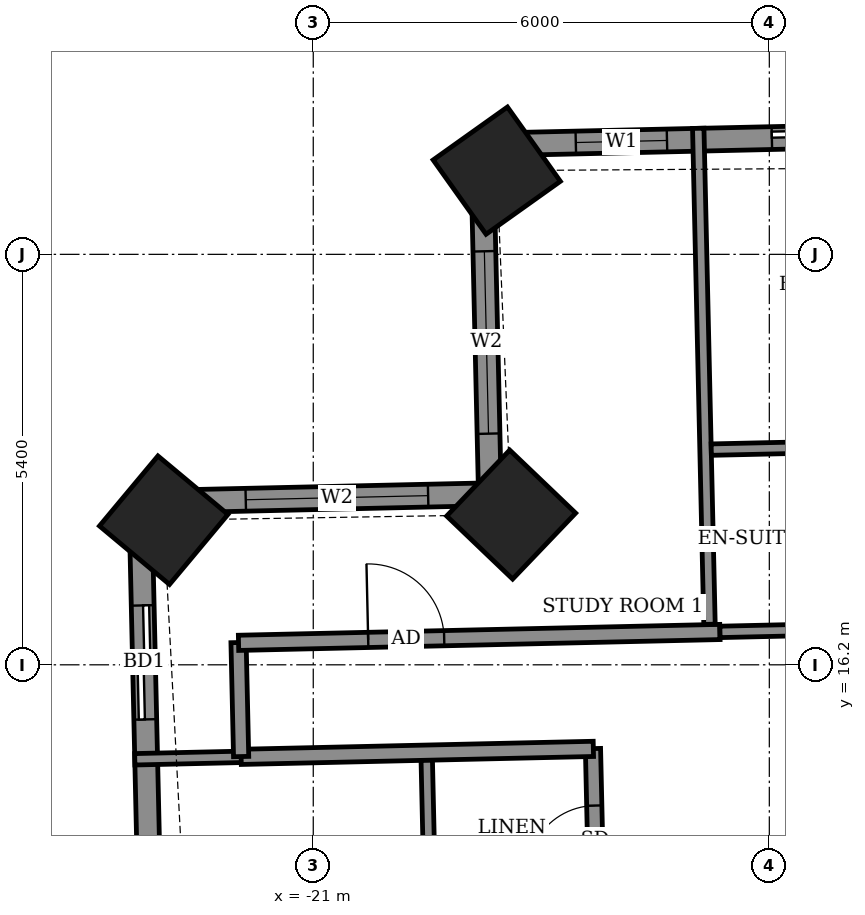
"""IFC4 building model, lengths in metres.
Left out: names, types, materials, properties, quantities, classifications, styles, units other than length and angle.
Written with IfcOpenShell. Run it as: python <this file> out.ifc"""

import sys

from ifc_helpers import new_model, si_unit, direction, frame, frame_2d, origin, origin_2d, place, context, subcontext, project, spatial, rectangle, extrude, element, fill, save


model = new_model("IFC4")
c1 = context("Model", 3, precision=1e-05, world=origin(), true_north=direction((0.0, 1.0)))
c2 = subcontext(c1, "Body", "Model", "MODEL_VIEW")
j1 = project(units=[si_unit("LENGTHUNIT", "METRE"), si_unit("PLANEANGLEUNIT", "RADIAN")], contexts=[c1])
p1 = place(None, origin())
s1 = spatial("IfcSite", under=j1, at=p1, CompositionType="ELEMENT")
p2 = place(p1, origin())
s2 = spatial("IfcBuilding", under=s1, at=p2, CompositionType="ELEMENT")
p3 = place(p2, frame((0.0, 0.0, 186.1)))
s3 = spatial("IfcBuildingStorey", under=s2, at=p3, CompositionType="ELEMENT", Elevation=186.1)
for number, where, z_axis, x_axis in (
    (1, (-18.586, 22.701, -0.55), (0.0, 0.0, 1.0), (-0.815, -0.58, 0.0)),
    (2, (-18.396, 18.177, -0.55), (0.0, 0.0, 1.0), (-0.691, -0.723, 0.0)),
    (3, (-22.968, 18.103, -0.55), (0.0, 0.0, 1.0), (-0.641, -0.768, 0.0)),
):
    element("IfcColumn", number, at=place(p3, frame(where, z_axis=z_axis, x_axis=x_axis)), inside=s3, PredefinedType="COLUMN", context=c2, shape_type="SweptSolid", body=[
        extrude(rectangle(XDim=1.2, YDim=1.2, at=origin_2d()), origin(), (0.0, 0.0, 1.0), 3.6),
    ])
p4 = place(p3, frame((21.589, 23.959, 0.0), z_axis=(0.0, 0.0, 1.0), x_axis=(-0.999742671382, -0.022684598702, 0.0)))
e4 = element("IfcWall", 4, at=p4, inside=s3, PredefinedType="SOLIDWALL", context=c2, shape_type="SweptSolid", body=[
    extrude(rectangle(XDim=40.381, YDim=0.3, at=frame_2d((20.19, 0.0))), origin(), (0.0, 0.0, 1.0), 3.05),
])
p5 = place(p4, frame((1.553, 0.0, 0.0)))
e5 = element("IfcOpeningElement", 5, at=p5, cuts=e4, PredefinedType="OPENING", context=c2, shape_type="SweptSolid", body=[
    extrude(rectangle(XDim=1.5, YDim=2.4, at=frame_2d((0.75, 1.2))), frame((0.0, 0.16, 0.0), z_axis=(0.0, -1.0, 0.0), x_axis=(1.0, 0.0, 0.0)), (0.0, 0.0, 1.0), 0.32),
])
p6 = place(p4, frame((4.33, 0.0, 0.0)))
e6 = element("IfcOpeningElement", 6, at=p6, cuts=e4, PredefinedType="OPENING", context=c2, shape_type="SweptSolid", body=[
    extrude(rectangle(XDim=1.5, YDim=2.4, at=frame_2d((0.75, 1.2))), frame((0.0, 0.16, 0.0), z_axis=(0.0, -1.0, 0.0), x_axis=(1.0, 0.0, 0.0)), (0.0, 0.0, 1.0), 0.32),
])
p7 = place(p4, frame((9.43, 0.0, 0.0)))
e7 = element("IfcOpeningElement", 7, at=p7, cuts=e4, PredefinedType="OPENING", context=c2, shape_type="SweptSolid", body=[
    extrude(rectangle(XDim=1.5, YDim=2.4, at=frame_2d((0.75, 1.2))), frame((0.0, 0.16, 0.0), z_axis=(0.0, -1.0, 0.0), x_axis=(1.0, 0.0, 0.0)), (0.0, 0.0, 1.0), 0.32),
])
p8 = place(p4, frame((14.37, 0.0, 0.0)))
e8 = element("IfcOpeningElement", 8, at=p8, cuts=e4, PredefinedType="OPENING", context=c2, shape_type="SweptSolid", body=[
    extrude(rectangle(XDim=1.5, YDim=2.4, at=frame_2d((0.75, 1.2))), frame((0.0, 0.16, 0.0), z_axis=(0.0, -1.0, 0.0), x_axis=(1.0, 0.0, 0.0)), (0.0, 0.0, 1.0), 0.32),
])
p9 = place(p4, frame((17.41, 0.0, 0.0)))
e9 = element("IfcOpeningElement", 9, at=p9, cuts=e4, PredefinedType="OPENING", context=c2, shape_type="SweptSolid", body=[
    extrude(rectangle(XDim=1.5, YDim=2.4, at=frame_2d((0.75, 1.2))), frame((0.0, 0.16, 0.0), z_axis=(0.0, -1.0, 0.0), x_axis=(1.0, 0.0, 0.0)), (0.0, 0.0, 1.0), 0.32),
])
p10 = place(p4, frame((22.03, 0.0, 0.0)))
e10 = element("IfcOpeningElement", 10, at=p10, cuts=e4, PredefinedType="OPENING", context=c2, shape_type="SweptSolid", body=[
    extrude(rectangle(XDim=1.5, YDim=2.4, at=frame_2d((0.75, 1.2))), frame((0.0, 0.16, 0.0), z_axis=(0.0, -1.0, 0.0), x_axis=(1.0, 0.0, 0.0)), (0.0, 0.0, 1.0), 0.32),
])
p11 = place(p4, frame((27.7, 0.0, 0.0)))
e11 = element("IfcOpeningElement", 11, at=p11, cuts=e4, PredefinedType="OPENING", context=c2, shape_type="SweptSolid", body=[
    extrude(rectangle(XDim=1.2, YDim=2.4, at=frame_2d((0.6, 1.2))), frame((0.0, 0.16, 0.0), z_axis=(0.0, -1.0, 0.0), x_axis=(1.0, 0.0, 0.0)), (0.0, 0.0, 1.0), 0.32),
])
p12 = place(p4, frame((30.48, 0.0, 0.0)))
e12 = element("IfcOpeningElement", 12, at=p12, cuts=e4, PredefinedType="OPENING", context=c2, shape_type="SweptSolid", body=[
    extrude(rectangle(XDim=1.5, YDim=2.4, at=frame_2d((0.75, 1.2))), frame((0.0, 0.16, 0.0), z_axis=(0.0, -1.0, 0.0), x_axis=(1.0, 0.0, 0.0)), (0.0, 0.0, 1.0), 0.32),
])
p13 = place(p4, frame((35.065, 0.0, 0.0)))
e13 = element("IfcOpeningElement", 13, at=p13, cuts=e4, PredefinedType="OPENING", context=c2, shape_type="SweptSolid", body=[
    extrude(rectangle(XDim=1.5, YDim=2.4, at=frame_2d((0.75, 1.2))), frame((0.0, 0.16, 0.0), z_axis=(0.0, -1.0, 0.0), x_axis=(1.0, 0.0, 0.0)), (0.0, 0.0, 1.0), 0.32),
])
p14 = place(p4, frame((37.945, 0.0, 0.9)))
e14 = element("IfcOpeningElement", 14, at=p14, cuts=e4, PredefinedType="OPENING", context=c2, shape_type="SweptSolid", body=[
    extrude(rectangle(XDim=1.2, YDim=1.5, at=frame_2d((0.6, 0.75))), frame((0.0, 0.16, 0.0), z_axis=(0.0, -1.0, 0.0), x_axis=(1.0, 0.0, 0.0)), (0.0, 0.0, 1.0), 0.32),
])
p15 = place(p3, frame((-18.781, 23.043, 0.0), z_axis=(0.0, 0.0, 1.0), x_axis=(0.022821468877, -0.999739556364, 0.0)))
e15 = element("IfcWall", 15, at=p15, inside=s3, PredefinedType="SOLIDWALL", context=c2, shape_type="SweptSolid", body=[
    extrude(rectangle(XDim=4.6, YDim=0.3, at=frame_2d((2.3, 0.0))), origin(), (0.0, 0.0, 1.0), 2.55),
])
p16 = place(p15, frame((1.403, 0.0, 0.9)))
e16 = element("IfcOpeningElement", 16, at=p16, cuts=e15, PredefinedType="OPENING", context=c2, shape_type="SweptSolid", body=[
    extrude(rectangle(XDim=2.4, YDim=1.5, at=frame_2d((1.2, 0.75))), frame((0.0, 0.16, 0.0), z_axis=(0.0, -1.0, 0.0), x_axis=(1.0, 0.0, 0.0)), (0.0, 0.0, 1.0), 0.32),
])
p17 = place(p3, frame((-18.676, 18.444, 0.0), z_axis=(0.0, 0.0, 1.0), x_axis=(-0.999744377441, -0.022609285172, 0.0)))
e17 = element("IfcWall", 17, at=p17, inside=s3, PredefinedType="SOLIDWALL", context=c2, shape_type="SweptSolid", body=[
    extrude(rectangle(XDim=4.6, YDim=0.3, at=frame_2d((2.3, 0.0))), origin(), (0.0, 0.0, 1.0), 2.55),
])
p18 = place(p17, frame((0.813, 0.0, 0.9)))
e18 = element("IfcOpeningElement", 18, at=p18, cuts=e17, PredefinedType="OPENING", context=c2, shape_type="SweptSolid", body=[
    extrude(rectangle(XDim=2.4, YDim=1.5, at=frame_2d((1.2, 0.75))), frame((0.0, 0.16, 0.0), z_axis=(0.0, -1.0, 0.0), x_axis=(1.0, 0.0, 0.0)), (0.0, 0.0, 1.0), 0.32),
])
p19 = place(p3, frame((-23.275, 18.34, 0.0), z_axis=(0.0, 0.0, 1.0), x_axis=(0.022705985163, -0.999742185885, 0.0)))
e19 = element("IfcWall", 19, at=p19, inside=s3, PredefinedType="SOLIDWALL", context=c2, shape_type="SweptSolid", body=[
    extrude(rectangle(XDim=10.43, YDim=0.3, at=frame_2d((5.215, 0.0))), origin(), (0.0, 0.0, 1.0), 3.05),
])
p20 = place(p19, frame((1.359, 0.0, 0.0)))
e20 = element("IfcOpeningElement", 20, at=p20, cuts=e19, PredefinedType="OPENING", context=c2, shape_type="SweptSolid", body=[
    extrude(rectangle(XDim=1.5, YDim=2.4, at=frame_2d((0.75, 1.2))), frame((0.0, 0.16, 0.0), z_axis=(0.0, -1.0, 0.0), x_axis=(1.0, 0.0, 0.0)), (0.0, 0.0, 1.0), 0.32),
])
p21 = place(p19, frame((6.543, 0.0, 0.9)))
e21 = element("IfcOpeningElement", 21, at=p21, cuts=e19, PredefinedType="OPENING", context=c2, shape_type="SweptSolid", body=[
    extrude(rectangle(XDim=2.4, YDim=1.5, at=frame_2d((1.2, 0.75))), frame((0.0, 0.16, 0.0), z_axis=(0.0, -1.0, 0.0), x_axis=(1.0, 0.0, 0.0)), (0.0, 0.0, 1.0), 0.32),
])
p22 = place(p3, frame((-16.684, -12.919, 0.0), z_axis=(0.0, 0.0, 1.0), x_axis=(-0.022694293906, 0.999742451346, 0.0)))
e22 = element("IfcWall", 22, at=p22, inside=s3, PredefinedType="PARTITIONING", context=c2, shape_type="SweptSolid", body=[
    extrude(rectangle(XDim=28.024, YDim=0.2, at=frame_2d((14.012, 0.0))), origin(), (0.0, 0.0, 1.0), 3.05),
])
p23 = place(p22, frame((22.825, 0.0, 0.0)))
e23 = element("IfcOpeningElement", 23, at=p23, cuts=e22, PredefinedType="OPENING", context=c2, shape_type="SweptSolid", body=[
    extrude(rectangle(XDim=1.0, YDim=2.1, at=frame_2d((0.5, 1.05))), frame((0.0, 0.11, 0.0), z_axis=(0.0, -1.0, 0.0), x_axis=(1.0, 0.0, 0.0)), (0.0, 0.0, 1.0), 0.22),
])
p24 = place(p22, frame((26.374, 0.0, 0.0)))
e24 = element("IfcOpeningElement", 24, at=p24, cuts=e22, PredefinedType="OPENING", context=c2, shape_type="SweptSolid", body=[
    extrude(rectangle(XDim=0.9, YDim=2.1, at=frame_2d((0.45, 1.05))), frame((0.0, 0.11, 0.0), z_axis=(0.0, -1.0, 0.0), x_axis=(1.0, 0.0, 0.0)), (0.0, 0.0, 1.0), 0.22),
])
p25 = place(p22, frame((16.7, 0.0, 0.0)))
e25 = element("IfcOpeningElement", 25, at=p25, cuts=e22, PredefinedType="OPENING", context=c2, shape_type="SweptSolid", body=[
    extrude(rectangle(XDim=1.0, YDim=2.1, at=frame_2d((0.5, 1.05))), frame((0.0, 0.11, 0.0), z_axis=(0.0, -1.0, 0.0), x_axis=(1.0, 0.0, 0.0)), (0.0, 0.0, 1.0), 0.22),
])
p26 = place(p22, frame((19.175, 0.0, 0.0)))
e26 = element("IfcOpeningElement", 26, at=p26, cuts=e22, PredefinedType="OPENING", context=c2, shape_type="SweptSolid", body=[
    extrude(rectangle(XDim=0.9, YDim=2.1, at=frame_2d((0.45, 1.05))), frame((0.0, 0.11, 0.0), z_axis=(0.0, -1.0, 0.0), x_axis=(1.0, 0.0, 0.0)), (0.0, 0.0, 1.0), 0.22),
])
p27 = place(p22, frame((14.725, 0.0, 0.0)))
e27 = element("IfcOpeningElement", 27, at=p27, cuts=e22, PredefinedType="OPENING", context=c2, shape_type="SweptSolid", body=[
    extrude(rectangle(XDim=1.0, YDim=2.1, at=frame_2d((0.5, 1.05))), frame((0.0, 0.11, 0.0), z_axis=(0.0, -1.0, 0.0), x_axis=(1.0, 0.0, 0.0)), (0.0, 0.0, 1.0), 0.22),
])
p28 = place(p22, frame((12.625, 0.0, 0.0)))
e28 = element("IfcOpeningElement", 28, at=p28, cuts=e22, PredefinedType="OPENING", context=c2, shape_type="SweptSolid", body=[
    extrude(rectangle(XDim=0.9, YDim=2.1, at=frame_2d((0.45, 1.05))), frame((0.0, 0.11, 0.0), z_axis=(0.0, -1.0, 0.0), x_axis=(1.0, 0.0, 0.0)), (0.0, 0.0, 1.0), 0.22),
])
p29 = place(p22, frame((10.375, 0.0, 0.0)))
e29 = element("IfcOpeningElement", 29, at=p29, cuts=e22, PredefinedType="OPENING", context=c2, shape_type="SweptSolid", body=[
    extrude(rectangle(XDim=1.0, YDim=2.1, at=frame_2d((0.5, 1.05))), frame((0.0, 0.11, 0.0), z_axis=(0.0, -1.0, 0.0), x_axis=(1.0, 0.0, 0.0)), (0.0, 0.0, 1.0), 0.22),
])
p30 = place(p22, frame((8.125, 0.0, 0.0)))
e30 = element("IfcOpeningElement", 30, at=p30, cuts=e22, PredefinedType="OPENING", context=c2, shape_type="SweptSolid", body=[
    extrude(rectangle(XDim=0.9, YDim=2.1, at=frame_2d((0.45, 1.05))), frame((0.0, 0.11, 0.0), z_axis=(0.0, -1.0, 0.0), x_axis=(1.0, 0.0, 0.0)), (0.0, 0.0, 1.0), 0.22),
])
p31 = place(p22, frame((3.462, 0.0, 0.0)))
e31 = element("IfcOpeningElement", 31, at=p31, cuts=e22, PredefinedType="OPENING", context=c2, shape_type="SweptSolid", body=[
    extrude(rectangle(XDim=1.0, YDim=2.1, at=frame_2d((0.5, 1.05))), frame((0.0, 0.11, 0.0), z_axis=(0.0, -1.0, 0.0), x_axis=(1.0, 0.0, 0.0)), (0.0, 0.0, 1.0), 0.22),
])
p32 = place(p22, frame((5.625, 0.0, 0.0)))
e32 = element("IfcOpeningElement", 32, at=p32, cuts=e22, PredefinedType="OPENING", context=c2, shape_type="SweptSolid", body=[
    extrude(rectangle(XDim=0.9, YDim=2.1, at=frame_2d((0.45, 1.05))), frame((0.0, 0.11, 0.0), z_axis=(0.0, -1.0, 0.0), x_axis=(1.0, 0.0, 0.0)), (0.0, 0.0, 1.0), 0.22),
])
p33 = place(p3, frame((-19.455, 12.649, 0.0), z_axis=(0.0, 0.0, 1.0), x_axis=(-0.022603288534, 0.999744513037, 0.0)))
e33 = element("IfcWall", 33, at=p33, inside=s3, PredefinedType="PARTITIONING", context=c2, shape_type="SweptSolid", body=[
    extrude(rectangle(XDim=2.301, YDim=0.15, at=frame_2d((1.15, 0.0))), origin(), (0.0, 0.0, 1.0), 3.05),
])
p34 = place(p3, frame((-23.348, 14.957, 0.0), z_axis=(0.0, 0.0, 1.0), x_axis=(0.999740216184, 0.022792545827, 0.0)))
e34 = element("IfcWall", 34, at=p34, inside=s3, PredefinedType="PARTITIONING", context=c2, shape_type="SweptSolid", body=[
    extrude(rectangle(XDim=1.403, YDim=0.15, at=frame_2d((0.702, 0.0))), origin(), (0.0, 0.0, 1.0), 2.55),
])
p35 = place(p3, frame((-21.949, 14.989, 0.0), z_axis=(0.0, 0.0, 1.0), x_axis=(0.999743491588, 0.022648422179, 0.0)))
e35 = element("IfcWall", 35, at=p35, inside=s3, PredefinedType="PARTITIONING", context=c2, shape_type="SweptSolid", body=[
    extrude(rectangle(XDim=4.635, YDim=0.2, at=frame_2d((2.318, 0.0))), origin(), (0.0, 0.0, 1.0), 3.05),
])
p36 = place(p3, frame((-21.949, 14.993, 0.0), z_axis=(0.0, 0.0, 1.0), x_axis=(-0.022617910375, 0.999744182344, 0.0)))
e36 = element("IfcWall", 36, at=p36, inside=s3, PredefinedType="PARTITIONING", context=c2, shape_type="SweptSolid", body=[
    extrude(rectangle(XDim=1.5, YDim=0.2, at=frame_2d((0.75, 0.0))), origin(), (0.0, 0.0, 1.0), 3.05),
])
p37 = place(p3, frame((-21.983, 16.489, 0.0), z_axis=(0.0, 0.0, 1.0), x_axis=(0.999744930163, 0.022584831499, 0.0)))
e37 = element("IfcWall", 37, at=p37, inside=s3, PredefinedType="PARTITIONING", context=c2, shape_type="SweptSolid", body=[
    extrude(rectangle(XDim=6.335, YDim=0.2, at=frame_2d((3.167, 0.0))), origin(), (0.0, 0.0, 1.0), 3.05),
])
p38 = place(p37, frame((1.706, 0.0, 0.0)))
e38 = element("IfcOpeningElement", 38, at=p38, cuts=e37, PredefinedType="OPENING", context=c2, shape_type="SweptSolid", body=[
    extrude(rectangle(XDim=1.0, YDim=2.1, at=frame_2d((0.5, 1.05))), frame((0.0, 0.11, 0.0), z_axis=(0.0, -1.0, 0.0), x_axis=(1.0, 0.0, 0.0)), (0.0, 0.0, 1.0), 0.22),
])
p39 = place(p3, frame((-15.649, 16.633, 0.0), z_axis=(0.0, 0.0, 1.0), x_axis=(0.999743261737, 0.022658565952, 0.0)))
e39 = element("IfcWall", 39, at=p39, inside=s3, PredefinedType="PARTITIONING", context=c2, shape_type="SweptSolid", body=[
    extrude(rectangle(XDim=30.536, YDim=0.15, at=frame_2d((15.268, 0.0))), origin(), (0.0, 0.0, 1.0), 3.05),
])
p40 = place(p39, frame((29.536, 0.0, 0.0)))
e40 = element("IfcOpeningElement", 40, at=p40, cuts=e39, PredefinedType="OPENING", context=c2, shape_type="SweptSolid", body=[
    extrude(rectangle(XDim=0.9, YDim=2.1, at=frame_2d((0.45, 1.05))), frame((0.0, 0.085, 0.0), z_axis=(0.0, -1.0, 0.0), x_axis=(1.0, 0.0, 0.0)), (0.0, 0.0, 1.0), 0.17),
])
p41 = place(p39, frame((27.965, 0.0, 0.0)))
e41 = element("IfcOpeningElement", 41, at=p41, cuts=e39, PredefinedType="OPENING", context=c2, shape_type="SweptSolid", body=[
    extrude(rectangle(XDim=0.9, YDim=2.1, at=frame_2d((0.45, 1.05))), frame((0.0, 0.085, 0.0), z_axis=(0.0, -1.0, 0.0), x_axis=(1.0, 0.0, 0.0)), (0.0, 0.0, 1.0), 0.17),
])
p42 = place(p39, frame((21.365, 0.0, 0.0)))
e42 = element("IfcOpeningElement", 42, at=p42, cuts=e39, PredefinedType="OPENING", context=c2, shape_type="SweptSolid", body=[
    extrude(rectangle(XDim=0.9, YDim=2.1, at=frame_2d((0.45, 1.05))), frame((0.0, 0.085, 0.0), z_axis=(0.0, -1.0, 0.0), x_axis=(1.0, 0.0, 0.0)), (0.0, 0.0, 1.0), 0.17),
])
p43 = place(p39, frame((19.565, 0.0, 0.0)))
e43 = element("IfcOpeningElement", 43, at=p43, cuts=e39, PredefinedType="OPENING", context=c2, shape_type="SweptSolid", body=[
    extrude(rectangle(XDim=0.9, YDim=2.1, at=frame_2d((0.45, 1.05))), frame((0.0, 0.085, 0.0), z_axis=(0.0, -1.0, 0.0), x_axis=(1.0, 0.0, 0.0)), (0.0, 0.0, 1.0), 0.17),
])
p44 = place(p39, frame((12.965, 0.0, 0.0)))
e44 = element("IfcOpeningElement", 44, at=p44, cuts=e39, PredefinedType="OPENING", context=c2, shape_type="SweptSolid", body=[
    extrude(rectangle(XDim=0.9, YDim=2.1, at=frame_2d((0.45, 1.05))), frame((0.0, 0.085, 0.0), z_axis=(0.0, -1.0, 0.0), x_axis=(1.0, 0.0, 0.0)), (0.0, 0.0, 1.0), 0.17),
])
p45 = place(p39, frame((11.14, 0.0, 0.0)))
e45 = element("IfcOpeningElement", 45, at=p45, cuts=e39, PredefinedType="OPENING", context=c2, shape_type="SweptSolid", body=[
    extrude(rectangle(XDim=0.9, YDim=2.1, at=frame_2d((0.45, 1.05))), frame((0.0, 0.085, 0.0), z_axis=(0.0, -1.0, 0.0), x_axis=(1.0, 0.0, 0.0)), (0.0, 0.0, 1.0), 0.17),
])
p46 = place(p39, frame((4.515, 0.0, 0.0)))
e46 = element("IfcOpeningElement", 46, at=p46, cuts=e39, PredefinedType="OPENING", context=c2, shape_type="SweptSolid", body=[
    extrude(rectangle(XDim=0.9, YDim=2.1, at=frame_2d((0.45, 1.05))), frame((0.0, 0.085, 0.0), z_axis=(0.0, -1.0, 0.0), x_axis=(1.0, 0.0, 0.0)), (0.0, 0.0, 1.0), 0.17),
])
p47 = place(p39, frame((2.715, 0.0, 0.0)))
e47 = element("IfcOpeningElement", 47, at=p47, cuts=e39, PredefinedType="OPENING", context=c2, shape_type="SweptSolid", body=[
    extrude(rectangle(XDim=0.9, YDim=2.1, at=frame_2d((0.45, 1.05))), frame((0.0, 0.085, 0.0), z_axis=(0.0, -1.0, 0.0), x_axis=(1.0, 0.0, 0.0)), (0.0, 0.0, 1.0), 0.17),
])
p48 = place(p3, frame((-15.787, 16.733, 0.0), z_axis=(0.0, 0.0, 1.0), x_axis=(-0.022667874761, 0.999743050715, 0.0)))
e48 = element("IfcWall", 48, at=p48, inside=s3, PredefinedType="PARTITIONING", context=c2, shape_type="SweptSolid", body=[
    extrude(rectangle(XDim=6.527, YDim=0.15, at=frame_2d((3.263, 0.0))), origin(), (0.0, 0.0, 1.0), 2.55),
])
p49 = place(p3, frame((-15.764, 19.031, 0.0), z_axis=(0.0, 0.0, 1.0), x_axis=(0.999749954681, 0.022361308448, 0.0)))
e49 = element("IfcWall", 49, at=p49, inside=s3, PredefinedType="PARTITIONING", context=c2, shape_type="SweptSolid", body=[
    extrude(rectangle(XDim=2.325, YDim=0.15, at=frame_2d((1.163, 0.0))), origin(), (0.0, 0.0, 1.0), 3.05),
])
p50 = place(p13, origin())
e50 = element("IfcDoor", 50, at=p50, inside=s3, OperationType="SLIDING_TO_LEFT", PredefinedType="DOOR", context=c2, shape_type="SweptSolid", body=[
    extrude(rectangle(XDim=1.5, YDim=2.4, at=frame_2d((0.75, 1.2))), frame((0.0, 0.025, 0.0), z_axis=(0.0, -1.0, 0.0), x_axis=(1.0, 0.0, 0.0)), (0.0, 0.0, 1.0), 0.05),
])
fill(e13, e50)
p51 = place(p14, origin())
e51 = element("IfcWindow", 51, at=p51, inside=s3, PartitioningType="SINGLE_PANEL", PredefinedType="WINDOW", context=c2, shape_type="SweptSolid", body=[
    extrude(rectangle(XDim=1.2, YDim=1.5, at=frame_2d((0.6, 0.75))), frame((0.0, 0.03, 0.0), z_axis=(0.0, -1.0, 0.0), x_axis=(1.0, 0.0, 0.0)), (0.0, 0.0, 1.0), 0.06),
])
fill(e14, e51)
p52 = place(p16, origin())
e52 = element("IfcWindow", 52, at=p52, inside=s3, PartitioningType="DOUBLE_PANEL_VERTICAL", PredefinedType="WINDOW", context=c2, shape_type="SweptSolid", body=[
    extrude(rectangle(XDim=2.4, YDim=1.5, at=frame_2d((1.2, 0.75))), frame((0.0, 0.03, 0.0), z_axis=(0.0, -1.0, 0.0), x_axis=(1.0, 0.0, 0.0)), (0.0, 0.0, 1.0), 0.06),
])
fill(e16, e52)
p53 = place(p18, origin())
e53 = element("IfcWindow", 53, at=p53, inside=s3, PartitioningType="DOUBLE_PANEL_VERTICAL", PredefinedType="WINDOW", context=c2, shape_type="SweptSolid", body=[
    extrude(rectangle(XDim=2.4, YDim=1.5, at=frame_2d((1.2, 0.75))), frame((0.0, 0.03, 0.0), z_axis=(0.0, -1.0, 0.0), x_axis=(1.0, 0.0, 0.0)), (0.0, 0.0, 1.0), 0.06),
])
fill(e18, e53)
p54 = place(p20, origin())
e54 = element("IfcDoor", 54, at=p54, inside=s3, OperationType="SLIDING_TO_LEFT", PredefinedType="DOOR", context=c2, shape_type="SweptSolid", body=[
    extrude(rectangle(XDim=1.5, YDim=2.4, at=frame_2d((0.75, 1.2))), frame((0.0, 0.025, 0.0), z_axis=(0.0, -1.0, 0.0), x_axis=(1.0, 0.0, 0.0)), (0.0, 0.0, 1.0), 0.05),
])
fill(e20, e54)
p55 = place(p38, origin())
e55 = element("IfcDoor", 55, at=p55, inside=s3, OperationType="SINGLE_SWING_LEFT", PredefinedType="DOOR", context=c2, shape_type="SweptSolid", body=[
    extrude(rectangle(XDim=1.0, YDim=2.1, at=frame_2d((0.5, 1.05))), frame((0.0, 0.025, 0.0), z_axis=(0.0, -1.0, 0.0), x_axis=(1.0, 0.0, 0.0)), (0.0, 0.0, 1.0), 0.05),
])
fill(e38, e55)
p56 = place(p24, origin())
e56 = element("IfcDoor", 56, at=p56, inside=s3, OperationType="SINGLE_SWING_RIGHT", PredefinedType="DOOR", context=c2, shape_type="SweptSolid", body=[
    extrude(rectangle(XDim=0.9, YDim=2.1, at=frame_2d((0.45, 1.05))), frame((0.0, 0.025, 0.0), z_axis=(0.0, -1.0, 0.0), x_axis=(1.0, 0.0, 0.0)), (0.0, 0.0, 1.0), 0.05),
])
fill(e24, e56)
save(model, sys.argv[1])
